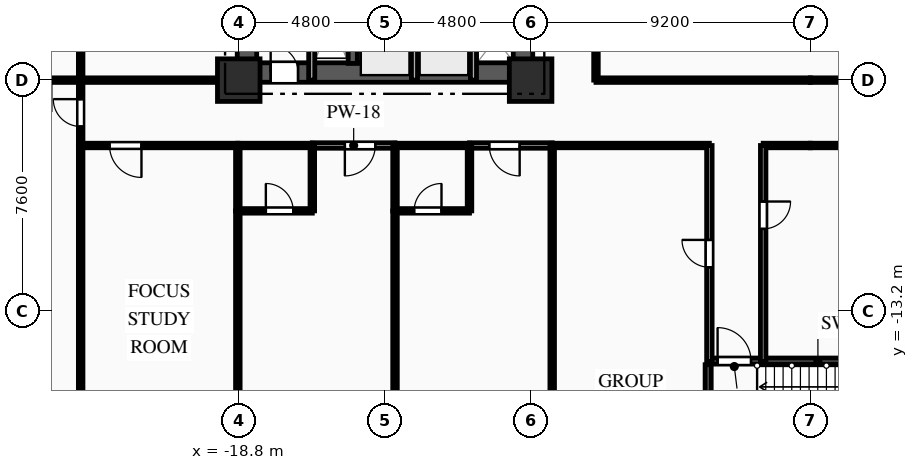
"""IFC4 building model, lengths in metres.
Left out: names, types, materials, properties, quantities, classifications, styles, units other than length and angle.
Written with IfcOpenShell. Run it as: python <this file> out.ifc"""

import sys

from ifc_helpers import new_model, si_unit, direction, frame, frame_2d, origin, origin_2d, place, context, subcontext, project, spatial, rectangle, extrude, element, fill, save


model = new_model("IFC4")
c1 = context("Model", 3, precision=1e-05, world=origin(), true_north=direction((0.0, 1.0)))
c2 = subcontext(c1, "Body", "Model", "MODEL_VIEW")
j1 = project(units=[si_unit("LENGTHUNIT", "METRE"), si_unit("PLANEANGLEUNIT", "RADIAN")], contexts=[c1])
p1 = place(None, origin())
s1 = spatial("IfcSite", under=j1, at=p1, CompositionType="ELEMENT")
p2 = place(p1, origin())
s2 = spatial("IfcBuilding", under=s1, at=p2, CompositionType="ELEMENT")
p3 = place(p2, frame((0.0, 0.0, 18.0)))
s3 = spatial("IfcBuildingStorey", under=s2, at=p3, CompositionType="ELEMENT", Elevation=18.0)
for number, where, z_axis, x_axis in (
    (1, (-18.8, -5.6, 0.0), (0.0, 0.0, 1.0), (1.0, 0.0, 0.0)),
    (2, (-9.2, -5.6, 0.0), (0.0, 0.0, 1.0), (1.0, 0.0, 0.0)),
):
    element("IfcColumn", number, at=place(p3, frame(where, z_axis=z_axis, x_axis=x_axis)), inside=s3, PredefinedType="COLUMN", context=c2, shape_type="SweptSolid", body=[
        extrude(rectangle(XDim=1.4, YDim=1.4, at=origin_2d()), origin(), (0.0, 0.0, 1.0), 4.5),
    ])
p4 = place(p3, frame((-18.8, -5.35, 0.0), z_axis=(0.0, 0.0, 1.0), x_axis=(1.0, 0.0, 0.0)))
e3 = element("IfcWall", 3, at=p4, inside=s3, PredefinedType="SHEAR", context=c2, shape_type="SweptSolid", body=[
    extrude(rectangle(XDim=9.6, YDim=0.64, at=frame_2d((4.8, 0.0))), origin(), (0.0, 0.0, 1.0), 4.17),
])
p5 = place(p4, frame((1.05, 0.0, 0.0)))
e4 = element("IfcOpeningElement", 4, at=p5, cuts=e3, PredefinedType="OPENING", context=c2, shape_type="SweptSolid", body=[
    extrude(rectangle(XDim=0.9, YDim=2.1, at=frame_2d((0.45, 1.05))), frame((0.0, 0.33, 0.0), z_axis=(0.0, -1.0, 0.0), x_axis=(1.0, 0.0, 0.0)), (0.0, 0.0, 1.0), 0.66),
])
p6 = place(p3, frame((-18.53, -5.05, 0.0), z_axis=(0.0, 0.0, 1.0), x_axis=(0.0, 1.0, 0.0)))
e5 = element("IfcWall", 5, at=p6, inside=s3, PredefinedType="SHEAR", context=c2, shape_type="SweptSolid", body=[
    extrude(rectangle(XDim=10.1, YDim=0.64, at=frame_2d((5.05, 0.0))), origin(), (0.0, 0.0, 1.0), 4.17),
])
p7 = place(p3, frame((-9.45, -5.05, 0.0), z_axis=(0.0, 0.0, 1.0), x_axis=(0.0, 1.0, 0.0)))
e6 = element("IfcWall", 6, at=p7, inside=s3, PredefinedType="SHEAR", context=c2, shape_type="SweptSolid", body=[
    extrude(rectangle(XDim=10.1, YDim=0.64, at=frame_2d((5.05, 0.0))), origin(), (0.0, 0.0, 1.0), 4.17),
])
p8 = place(p7, frame((7.175, 0.0, 0.0)))
e7 = element("IfcOpeningElement", 7, at=p8, cuts=e6, PredefinedType="OPENING", context=c2, shape_type="SweptSolid", body=[
    extrude(rectangle(XDim=0.9, YDim=2.1, at=frame_2d((0.45, 1.05))), frame((0.0, 0.33, 0.0), z_axis=(0.0, -1.0, 0.0), x_axis=(1.0, 0.0, 0.0)), (0.0, 0.0, 1.0), 0.66),
])
p9 = place(p7, frame((2.4, 0.0, 0.0)))
e8 = element("IfcOpeningElement", 8, at=p9, cuts=e6, PredefinedType="OPENING", context=c2, shape_type="SweptSolid", body=[
    extrude(rectangle(XDim=1.2, YDim=2.15, at=frame_2d((0.6, 1.075))), frame((0.0, 0.33, 0.0), z_axis=(0.0, -1.0, 0.0), x_axis=(1.0, 0.0, 0.0)), (0.0, 0.0, 1.0), 0.66),
])
p10 = place(p3, frame((-15.05, -5.05, 0.0), z_axis=(0.0, 0.0, 1.0), x_axis=(0.0, 1.0, 0.0)))
e9 = element("IfcWall", 9, at=p10, inside=s3, PredefinedType="SHEAR", context=c2, shape_type="SweptSolid", body=[
    extrude(rectangle(XDim=10.1, YDim=0.3, at=frame_2d((5.05, 0.0))), origin(), (0.0, 0.0, 1.0), 4.17),
])
p11 = place(p3, frame((-3.36, -14.84, 0.0), z_axis=(0.0, 0.0, 1.0), x_axis=(1.0, 0.0, 0.0)))
e10 = element("IfcWall", 10, at=p11, inside=s3, PredefinedType="SHEAR", context=c2, shape_type="SweptSolid", body=[
    extrude(rectangle(XDim=7.22, YDim=0.2, at=frame_2d((3.61, 0.0))), origin(), (0.0, 0.0, 1.0), 4.17),
])
p12 = place(p11, frame((0.31, 0.0, 0.0)))
e11 = element("IfcOpeningElement", 11, at=p12, cuts=e10, PredefinedType="OPENING", context=c2, shape_type="SweptSolid", body=[
    extrude(rectangle(XDim=1.1, YDim=2.15, at=frame_2d((0.55, 1.075))), frame((0.0, 0.11, 0.0), z_axis=(0.0, -1.0, 0.0), x_axis=(1.0, 0.0, 0.0)), (0.0, 0.0, 1.0), 0.22),
])
p13 = place(p3, frame((-3.36, -18.04, 0.0), z_axis=(0.0, 0.0, 1.0), x_axis=(0.0, 1.0, 0.0)))
e12 = element("IfcWall", 12, at=p13, inside=s3, PredefinedType="SHEAR", context=c2, shape_type="SweptSolid", body=[
    extrude(rectangle(XDim=3.08, YDim=0.2, at=frame_2d((1.54, 0.0))), origin(), (0.0, 0.0, 1.0), 4.17),
])
p14 = place(p3, frame((-16.4, -5.6, 0.0), z_axis=(0.0, 0.0, 1.0), x_axis=(0.0, 1.0, 0.0)))
e13 = element("IfcWall", 13, at=p14, inside=s3, PredefinedType="PARTITIONING", context=c2, shape_type="SweptSolid", body=[
    extrude(rectangle(XDim=3.49, YDim=0.2, at=frame_2d((1.745, 0.0))), origin(), (0.0, 0.0, 1.0), 4.17),
])
for number, where, z_axis, x_axis in (
    (14, (-13.02, -5.6, 0.0), (0.0, 0.0, 1.0), (0.0, 1.0, 0.0)),
    (15, (-11.08, -5.6, 0.0), (0.0, 0.0, 1.0), (0.0, 1.0, 0.0)),
):
    element("IfcWall", number, at=place(p3, frame(where, z_axis=z_axis, x_axis=x_axis)), inside=s3, PredefinedType="PARTITIONING", context=c2, shape_type="SweptSolid", body=[
        extrude(rectangle(XDim=2.25, YDim=0.2, at=frame_2d((1.125, 0.0))), origin(), (0.0, 0.0, 1.0), 4.17),
    ])
p15 = place(p3, frame((-24.0, -7.75, 0.0), z_axis=(0.0, 0.0, 1.0), x_axis=(0.0, 1.0, 0.0)))
e16 = element("IfcWall", 16, at=p15, inside=s3, PredefinedType="PARTITIONING", context=c2, shape_type="SweptSolid", body=[
    extrude(rectangle(XDim=2.15, YDim=0.15, at=frame_2d((1.075, 0.0))), origin(), (0.0, 0.0, 1.0), 4.17),
])
p16 = place(p15, frame((0.625, 0.0, 0.0)))
e17 = element("IfcOpeningElement", 17, at=p16, cuts=e16, PredefinedType="OPENING", context=c2, shape_type="SweptSolid", body=[
    extrude(rectangle(XDim=0.9, YDim=2.1, at=frame_2d((0.45, 1.05))), frame((0.0, 0.085, 0.0), z_axis=(0.0, -1.0, 0.0), x_axis=(1.0, 0.0, 0.0)), (0.0, 0.0, 1.0), 0.17),
])
p17 = place(p3, frame((-24.0, -5.6, 0.0), z_axis=(0.0, 0.0, 1.0), x_axis=(1.0, 0.0, 0.0)))
e18 = element("IfcWall", 18, at=p17, inside=s3, PredefinedType="PARTITIONING", context=c2, shape_type="SweptSolid", body=[
    extrude(rectangle(XDim=5.2, YDim=0.15, at=frame_2d((2.6, 0.0))), origin(), (0.0, 0.0, 1.0), 4.17),
])
p18 = place(p3, frame((-18.83, -7.75, 0.0), z_axis=(0.0, 0.0, 1.0), x_axis=(-1.0, 0.0, 0.0)))
e19 = element("IfcWall", 19, at=p18, inside=s3, PredefinedType="PARTITIONING", context=c2, shape_type="SweptSolid", body=[
    extrude(rectangle(XDim=5.17, YDim=0.15, at=frame_2d((2.585, 0.0))), origin(), (0.0, 0.0, 1.0), 4.17),
])
p19 = place(p18, frame((3.17, 0.0, 0.0)))
e20 = element("IfcOpeningElement", 20, at=p19, cuts=e19, PredefinedType="OPENING", context=c2, shape_type="SweptSolid", body=[
    extrude(rectangle(XDim=1.05, YDim=2.15, at=frame_2d((0.525, 1.075))), frame((0.0, 0.085, 0.0), z_axis=(0.0, -1.0, 0.0), x_axis=(1.0, 0.0, 0.0)), (0.0, 0.0, 1.0), 0.17),
])
p20 = place(p3, frame((-13.66, -7.75, 0.0), z_axis=(0.0, 0.0, 1.0), x_axis=(-1.0, 0.0, 0.0)))
e21 = element("IfcWall", 21, at=p20, inside=s3, PredefinedType="PARTITIONING", context=c2, shape_type="SweptSolid", body=[
    extrude(rectangle(XDim=2.72, YDim=0.18, at=frame_2d((1.36, 0.0))), origin(), (0.0, 0.0, 1.0), 4.17),
])
p21 = place(p20, frame((0.65, 0.0, 0.0)))
e22 = element("IfcOpeningElement", 22, at=p21, cuts=e21, PredefinedType="OPENING", context=c2, shape_type="SweptSolid", body=[
    extrude(rectangle(XDim=1.0, YDim=2.15, at=frame_2d((0.5, 1.075))), frame((0.0, 0.1, 0.0), z_axis=(0.0, -1.0, 0.0), x_axis=(1.0, 0.0, 0.0)), (0.0, 0.0, 1.0), 0.2),
])
p22 = place(p3, frame((-16.38, -7.75, 0.0), z_axis=(0.0, 0.0, 1.0), x_axis=(-1.0, 0.0, 0.0)))
e23 = element("IfcWall", 23, at=p22, inside=s3, PredefinedType="PLUMBINGWALL", context=c2, shape_type="SweptSolid", body=[
    extrude(rectangle(XDim=2.45, YDim=0.15, at=frame_2d((1.225, 0.0))), origin(), (0.0, 0.0, 1.0), 4.17),
])
p23 = place(p3, frame((-8.49, -7.75, 0.0), z_axis=(0.0, 0.0, 1.0), x_axis=(-1.0, 0.0, 0.0)))
e24 = element("IfcWall", 24, at=p23, inside=s3, PredefinedType="PARTITIONING", context=c2, shape_type="SweptSolid", body=[
    extrude(rectangle(XDim=2.72, YDim=0.18, at=frame_2d((1.36, 0.0))), origin(), (0.0, 0.0, 1.0), 4.17),
])
p24 = place(p23, frame((1.07, 0.0, 0.0)))
e25 = element("IfcOpeningElement", 25, at=p24, cuts=e24, PredefinedType="OPENING", context=c2, shape_type="SweptSolid", body=[
    extrude(rectangle(XDim=1.0, YDim=2.15, at=frame_2d((0.5, 1.075))), frame((0.0, 0.1, 0.0), z_axis=(0.0, -1.0, 0.0), x_axis=(1.0, 0.0, 0.0)), (0.0, 0.0, 1.0), 0.2),
])
p25 = place(p3, frame((-11.21, -7.75, 0.0), z_axis=(0.0, 0.0, 1.0), x_axis=(-1.0, 0.0, 0.0)))
e26 = element("IfcWall", 26, at=p25, inside=s3, PredefinedType="PLUMBINGWALL", context=c2, shape_type="SweptSolid", body=[
    extrude(rectangle(XDim=2.45, YDim=0.15, at=frame_2d((1.225, 0.0))), origin(), (0.0, 0.0, 1.0), 4.17),
])
p26 = place(p3, frame((-3.32, -7.75, 0.0), z_axis=(0.0, 0.0, 1.0), x_axis=(-1.0, 0.0, 0.0)))
e27 = element("IfcWall", 27, at=p26, inside=s3, PredefinedType="PARTITIONING", context=c2, shape_type="SweptSolid", body=[
    extrude(rectangle(XDim=5.17, YDim=0.15, at=frame_2d((2.585, 0.0))), origin(), (0.0, 0.0, 1.0), 4.17),
])
p27 = place(p3, frame((0.0, -7.75, 0.0), z_axis=(0.0, 0.0, 1.0), x_axis=(-1.0, 0.0, 0.0)))
e28 = element("IfcWall", 28, at=p27, inside=s3, PredefinedType="PARTITIONING", context=c2, shape_type="SweptSolid", body=[
    extrude(rectangle(XDim=1.55, YDim=0.15, at=frame_2d((0.775, 0.0))), origin(), (0.0, 0.0, 1.0), 4.17),
])
p28 = place(p3, frame((-7.05, -5.6, 0.0), z_axis=(0.0, 0.0, 1.0), x_axis=(1.0, 0.0, 0.0)))
e29 = element("IfcWall", 29, at=p28, inside=s3, PredefinedType="PARTITIONING", context=c2, shape_type="SweptSolid", body=[
    extrude(rectangle(XDim=7.05, YDim=0.15, at=frame_2d((3.525, 0.0))), origin(), (0.0, 0.0, 1.0), 3.655),
])
p29 = place(p3, frame((4.838, -7.75, 0.0), z_axis=(0.0, 0.0, 1.0), x_axis=(-1.0, 0.0, 0.0)))
e30 = element("IfcWall", 30, at=p29, inside=s3, PredefinedType="PARTITIONING", context=c2, shape_type="SweptSolid", body=[
    extrude(rectangle(XDim=4.838, YDim=0.15, at=frame_2d((2.419, 0.0))), origin(), (0.0, 0.0, 1.0), 4.17),
])
p30 = place(p3, frame((0.0, -5.6, 0.0), z_axis=(0.0, 0.0, 1.0), x_axis=(1.0, 0.0, 0.0)))
e31 = element("IfcWall", 31, at=p30, inside=s3, PredefinedType="PARTITIONING", context=c2, shape_type="SweptSolid", body=[
    extrude(rectangle(XDim=7.05, YDim=0.15, at=frame_2d((3.525, 0.0))), origin(), (0.0, 0.0, 1.0), 3.655),
])
p31 = place(p3, frame((-7.05, 8.5, 0.0), z_axis=(0.0, 0.0, 1.0), x_axis=(0.0, -1.0, 0.0)))
e32 = element("IfcWall", 32, at=p31, inside=s3, PredefinedType="PARTITIONING", context=c2, shape_type="SweptSolid", body=[
    extrude(rectangle(XDim=14.1, YDim=0.15, at=frame_2d((7.05, 0.0))), origin(), (0.0, 0.0, 1.0), 4.17),
])
p32 = place(p31, frame((8.011, 0.0, 0.0)))
e33 = element("IfcOpeningElement", 33, at=p32, cuts=e32, PredefinedType="OPENING", context=c2, shape_type="SweptSolid", body=[
    extrude(rectangle(XDim=1.05, YDim=2.15, at=frame_2d((0.525, 1.075))), frame((0.0, 0.085, 0.0), z_axis=(0.0, -1.0, 0.0), x_axis=(1.0, 0.0, 0.0)), (0.0, 0.0, 1.0), 0.17),
])
p33 = place(p3, frame((-3.32, -14.86, 0.0), z_axis=(0.0, 0.0, 1.0), x_axis=(0.0, 1.0, 0.0)))
e34 = element("IfcWall", 34, at=p33, inside=s3, PredefinedType="PARTITIONING", context=c2, shape_type="SweptSolid", body=[
    extrude(rectangle(XDim=7.11, YDim=0.18, at=frame_2d((3.555, 0.0))), origin(), (0.0, 0.0, 1.0), 4.17),
])
p34 = place(p33, frame((3.105, 0.0, 0.0)))
e35 = element("IfcOpeningElement", 35, at=p34, cuts=e34, PredefinedType="OPENING", context=c2, shape_type="SweptSolid", body=[
    extrude(rectangle(XDim=0.9, YDim=2.1, at=frame_2d((0.45, 1.05))), frame((0.0, 0.1, 0.0), z_axis=(0.0, -1.0, 0.0), x_axis=(1.0, 0.0, 0.0)), (0.0, 0.0, 1.0), 0.2),
])
p35 = place(p3, frame((-1.55, -7.75, 0.0), z_axis=(0.0, 0.0, 1.0), x_axis=(0.0, -1.0, 0.0)))
e36 = element("IfcWall", 36, at=p35, inside=s3, PredefinedType="PARTITIONING", context=c2, shape_type="SweptSolid", body=[
    extrude(rectangle(XDim=7.11, YDim=0.18, at=frame_2d((3.555, 0.0))), origin(), (0.0, 0.0, 1.0), 4.17),
])
p36 = place(p35, frame((1.843, 0.0, 0.0)))
e37 = element("IfcOpeningElement", 37, at=p36, cuts=e36, PredefinedType="OPENING", context=c2, shape_type="SweptSolid", body=[
    extrude(rectangle(XDim=0.9, YDim=2.1, at=frame_2d((0.45, 1.05))), frame((0.0, 0.1, 0.0), z_axis=(0.0, -1.0, 0.0), x_axis=(1.0, 0.0, 0.0)), (0.0, 0.0, 1.0), 0.2),
])
p37 = place(p3, frame((-24.0, -5.6, 0.0), z_axis=(0.0, 0.0, 1.0), x_axis=(-1.0, 0.0, 0.0)))
e38 = element("IfcWall", 38, at=p37, inside=s3, PredefinedType="PARTITIONING", context=c2, shape_type="SweptSolid", body=[
    extrude(rectangle(XDim=2.65, YDim=0.15, at=frame_2d((1.325, 0.0))), origin(), (0.0, 0.0, 1.0), 4.17),
])
p38 = place(p37, frame((0.965, 0.0, 0.0)))
e39 = element("IfcOpeningElement", 39, at=p38, cuts=e38, PredefinedType="OPENING", context=c2, shape_type="SweptSolid", body=[
    extrude(rectangle(XDim=1.05, YDim=2.15, at=frame_2d((0.525, 1.075))), frame((0.0, 0.085, 0.0), z_axis=(0.0, -1.0, 0.0), x_axis=(1.0, 0.0, 0.0)), (0.0, 0.0, 1.0), 0.17),
])
p39 = place(p3, frame((-24.0, 8.5, 0.0), z_axis=(0.0, 0.0, 1.0), x_axis=(0.0, -1.0, 0.0)))
e40 = element("IfcWall", 40, at=p39, inside=s3, PredefinedType="PARTITIONING", context=c2, shape_type="SweptSolid", body=[
    extrude(rectangle(XDim=14.1, YDim=0.15, at=frame_2d((7.05, 0.0))), origin(), (0.0, 0.0, 1.0), 4.17),
])
p40 = place(p3, frame((-24.0, -7.75, 0.0), z_axis=(0.0, 0.0, 1.0), x_axis=(0.0, -1.0, 0.0)))
e41 = element("IfcWall", 41, at=p40, inside=s3, PredefinedType="PARTITIONING", context=c2, shape_type="SweptSolid", body=[
    extrude(rectangle(XDim=14.05, YDim=0.15, at=frame_2d((7.025, 0.0))), origin(), (0.0, 0.0, 1.0), 4.17),
])
p41 = place(p3, frame((-18.83, -9.9, 0.0), z_axis=(0.0, 0.0, 1.0), x_axis=(0.0, -1.0, 0.0)))
e42 = element("IfcWall", 42, at=p41, inside=s3, PredefinedType="PARTITIONING", context=c2, shape_type="SweptSolid", body=[
    extrude(rectangle(XDim=11.9, YDim=0.15, at=frame_2d((5.95, 0.0))), origin(), (0.0, 0.0, 1.0), 3.655),
])
p42 = place(p3, frame((-18.83, -7.75, 0.0), z_axis=(0.0, 0.0, 1.0), x_axis=(0.0, -1.0, 0.0)))
e43 = element("IfcWall", 43, at=p42, inside=s3, PredefinedType="PLUMBINGWALL", context=c2, shape_type="SweptSolid", body=[
    extrude(rectangle(XDim=2.15, YDim=0.15, at=frame_2d((1.075, 0.0))), origin(), (0.0, 0.0, 1.0), 3.655),
])
p43 = place(p3, frame((-18.83, -9.9, 0.0), z_axis=(0.0, 0.0, 1.0), x_axis=(1.0, 0.0, 0.0)))
e44 = element("IfcWall", 44, at=p43, inside=s3, PredefinedType="PLUMBINGWALL", context=c2, shape_type="SweptSolid", body=[
    extrude(rectangle(XDim=2.45, YDim=0.15, at=frame_2d((1.225, 0.0))), origin(), (0.0, 0.0, 1.0), 4.17),
])
p44 = place(p43, frame((0.921, 0.0, 0.0)))
e45 = element("IfcOpeningElement", 45, at=p44, cuts=e44, PredefinedType="OPENING", context=c2, shape_type="SweptSolid", body=[
    extrude(rectangle(XDim=0.9, YDim=2.1, at=frame_2d((0.45, 1.05))), frame((0.0, 0.085, 0.0), z_axis=(0.0, -1.0, 0.0), x_axis=(1.0, 0.0, 0.0)), (0.0, 0.0, 1.0), 0.17),
])
p45 = place(p3, frame((-16.38, -9.9, 0.0), z_axis=(0.0, 0.0, 1.0), x_axis=(0.0, 1.0, 0.0)))
e46 = element("IfcWall", 46, at=p45, inside=s3, PredefinedType="PLUMBINGWALL", context=c2, shape_type="SweptSolid", body=[
    extrude(rectangle(XDim=2.15, YDim=0.15, at=frame_2d((1.075, 0.0))), origin(), (0.0, 0.0, 1.0), 4.17),
])
p46 = place(p3, frame((-13.66, -9.9, 0.0), z_axis=(0.0, 0.0, 1.0), x_axis=(0.0, -1.0, 0.0)))
e47 = element("IfcWall", 47, at=p46, inside=s3, PredefinedType="PARTITIONING", context=c2, shape_type="SweptSolid", body=[
    extrude(rectangle(XDim=11.9, YDim=0.15, at=frame_2d((5.95, 0.0))), origin(), (0.0, 0.0, 1.0), 4.17),
])
p47 = place(p3, frame((-13.66, -7.75, 0.0), z_axis=(0.0, 0.0, 1.0), x_axis=(0.0, -1.0, 0.0)))
e48 = element("IfcWall", 48, at=p47, inside=s3, PredefinedType="PLUMBINGWALL", context=c2, shape_type="SweptSolid", body=[
    extrude(rectangle(XDim=2.15, YDim=0.15, at=frame_2d((1.075, 0.0))), origin(), (0.0, 0.0, 1.0), 4.17),
])
p48 = place(p3, frame((-13.66, -9.9, 0.0), z_axis=(0.0, 0.0, 1.0), x_axis=(1.0, 0.0, 0.0)))
e49 = element("IfcWall", 49, at=p48, inside=s3, PredefinedType="PLUMBINGWALL", context=c2, shape_type="SweptSolid", body=[
    extrude(rectangle(XDim=2.45, YDim=0.15, at=frame_2d((1.225, 0.0))), origin(), (0.0, 0.0, 1.0), 4.17),
])
p49 = place(p48, frame((0.629, 0.0, 0.0)))
e50 = element("IfcOpeningElement", 50, at=p49, cuts=e49, PredefinedType="OPENING", context=c2, shape_type="SweptSolid", body=[
    extrude(rectangle(XDim=0.9, YDim=2.1, at=frame_2d((0.45, 1.05))), frame((0.0, 0.085, 0.0), z_axis=(0.0, -1.0, 0.0), x_axis=(1.0, 0.0, 0.0)), (0.0, 0.0, 1.0), 0.17),
])
p50 = place(p3, frame((-11.21, -9.9, 0.0), z_axis=(0.0, 0.0, 1.0), x_axis=(0.0, 1.0, 0.0)))
e51 = element("IfcWall", 51, at=p50, inside=s3, PredefinedType="PLUMBINGWALL", context=c2, shape_type="SweptSolid", body=[
    extrude(rectangle(XDim=2.15, YDim=0.15, at=frame_2d((1.075, 0.0))), origin(), (0.0, 0.0, 1.0), 4.17),
])
p51 = place(p3, frame((-8.49, -7.75, 0.0), z_axis=(0.0, 0.0, 1.0), x_axis=(0.0, -1.0, 0.0)))
e52 = element("IfcWall", 52, at=p51, inside=s3, PredefinedType="PARTITIONING", context=c2, shape_type="SweptSolid", body=[
    extrude(rectangle(XDim=14.05, YDim=0.15, at=frame_2d((7.025, 0.0))), origin(), (0.0, 0.0, 1.0), 4.17),
])
p52 = place(p5, origin())
e53 = element("IfcDoor", 53, at=p52, inside=s3, OperationType="SINGLE_SWING_LEFT", PredefinedType="DOOR", context=c2, shape_type="SweptSolid", body=[
    extrude(rectangle(XDim=0.9, YDim=2.1, at=frame_2d((0.45, 1.05))), frame((0.0, 0.025, 0.0), z_axis=(0.0, -1.0, 0.0), x_axis=(1.0, 0.0, 0.0)), (0.0, 0.0, 1.0), 0.05),
])
fill(e4, e53)
p53 = place(p12, origin())
e54 = element("IfcDoor", 54, at=p53, inside=s3, OperationType="SINGLE_SWING_LEFT", PredefinedType="DOOR", context=c2, shape_type="SweptSolid", body=[
    extrude(rectangle(XDim=1.1, YDim=2.15, at=frame_2d((0.55, 1.075))), frame((0.0, 0.025, 0.0), z_axis=(0.0, -1.0, 0.0), x_axis=(1.0, 0.0, 0.0)), (0.0, 0.0, 1.0), 0.05),
])
fill(e11, e54)
p54 = place(p16, origin())
e55 = element("IfcDoor", 55, at=p54, inside=s3, OperationType="SINGLE_SWING_RIGHT", PredefinedType="DOOR", context=c2, shape_type="SweptSolid", body=[
    extrude(rectangle(XDim=0.9, YDim=2.1, at=frame_2d((0.45, 1.05))), frame((0.0, 0.025, 0.0), z_axis=(0.0, -1.0, 0.0), x_axis=(1.0, 0.0, 0.0)), (0.0, 0.0, 1.0), 0.05),
])
fill(e17, e55)
p55 = place(p19, origin())
e56 = element("IfcDoor", 56, at=p55, inside=s3, OperationType="SINGLE_SWING_LEFT", PredefinedType="DOOR", context=c2, shape_type="SweptSolid", body=[
    extrude(rectangle(XDim=1.05, YDim=2.15, at=frame_2d((0.525, 1.075))), frame((0.0, 0.025, 0.0), z_axis=(0.0, -1.0, 0.0), x_axis=(1.0, 0.0, 0.0)), (0.0, 0.0, 1.0), 0.05),
])
fill(e20, e56)
p56 = place(p21, origin())
e57 = element("IfcDoor", 57, at=p56, inside=s3, OperationType="SINGLE_SWING_RIGHT", PredefinedType="DOOR", context=c2, shape_type="SweptSolid", body=[
    extrude(rectangle(XDim=1.0, YDim=2.15, at=frame_2d((0.5, 1.075))), frame((0.0, 0.025, 0.0), z_axis=(0.0, -1.0, 0.0), x_axis=(1.0, 0.0, 0.0)), (0.0, 0.0, 1.0), 0.05),
])
fill(e22, e57)
p57 = place(p24, origin())
e58 = element("IfcDoor", 58, at=p57, inside=s3, OperationType="SINGLE_SWING_LEFT", PredefinedType="DOOR", context=c2, shape_type="SweptSolid", body=[
    extrude(rectangle(XDim=1.0, YDim=2.15, at=frame_2d((0.5, 1.075))), frame((0.0, 0.025, 0.0), z_axis=(0.0, -1.0, 0.0), x_axis=(1.0, 0.0, 0.0)), (0.0, 0.0, 1.0), 0.05),
])
fill(e25, e58)
p58 = place(p34, origin())
e59 = element("IfcDoor", 59, at=p58, inside=s3, OperationType="SINGLE_SWING_RIGHT", PredefinedType="DOOR", context=c2, shape_type="SweptSolid", body=[
    extrude(rectangle(XDim=0.9, YDim=2.1, at=frame_2d((0.45, 1.05))), frame((0.0, 0.025, 0.0), z_axis=(0.0, -1.0, 0.0), x_axis=(1.0, 0.0, 0.0)), (0.0, 0.0, 1.0), 0.05),
])
fill(e35, e59)
p59 = place(p36, origin())
e60 = element("IfcDoor", 60, at=p59, inside=s3, OperationType="SINGLE_SWING_LEFT", PredefinedType="DOOR", context=c2, shape_type="SweptSolid", body=[
    extrude(rectangle(XDim=0.9, YDim=2.1, at=frame_2d((0.45, 1.05))), frame((0.0, 0.025, 0.0), z_axis=(0.0, -1.0, 0.0), x_axis=(1.0, 0.0, 0.0)), (0.0, 0.0, 1.0), 0.05),
])
fill(e37, e60)
p60 = place(p44, origin())
e61 = element("IfcDoor", 61, at=p60, inside=s3, OperationType="SINGLE_SWING_LEFT", PredefinedType="DOOR", context=c2, shape_type="SweptSolid", body=[
    extrude(rectangle(XDim=0.9, YDim=2.1, at=frame_2d((0.45, 1.05))), frame((0.0, 0.025, 0.0), z_axis=(0.0, -1.0, 0.0), x_axis=(1.0, 0.0, 0.0)), (0.0, 0.0, 1.0), 0.05),
])
fill(e45, e61)
p61 = place(p49, origin())
e62 = element("IfcDoor", 62, at=p61, inside=s3, OperationType="SINGLE_SWING_RIGHT", PredefinedType="DOOR", context=c2, shape_type="SweptSolid", body=[
    extrude(rectangle(XDim=0.9, YDim=2.1, at=frame_2d((0.45, 1.05))), frame((0.0, 0.025, 0.0), z_axis=(0.0, -1.0, 0.0), x_axis=(1.0, 0.0, 0.0)), (0.0, 0.0, 1.0), 0.05),
])
fill(e50, e62)
save(model, sys.argv[1])
